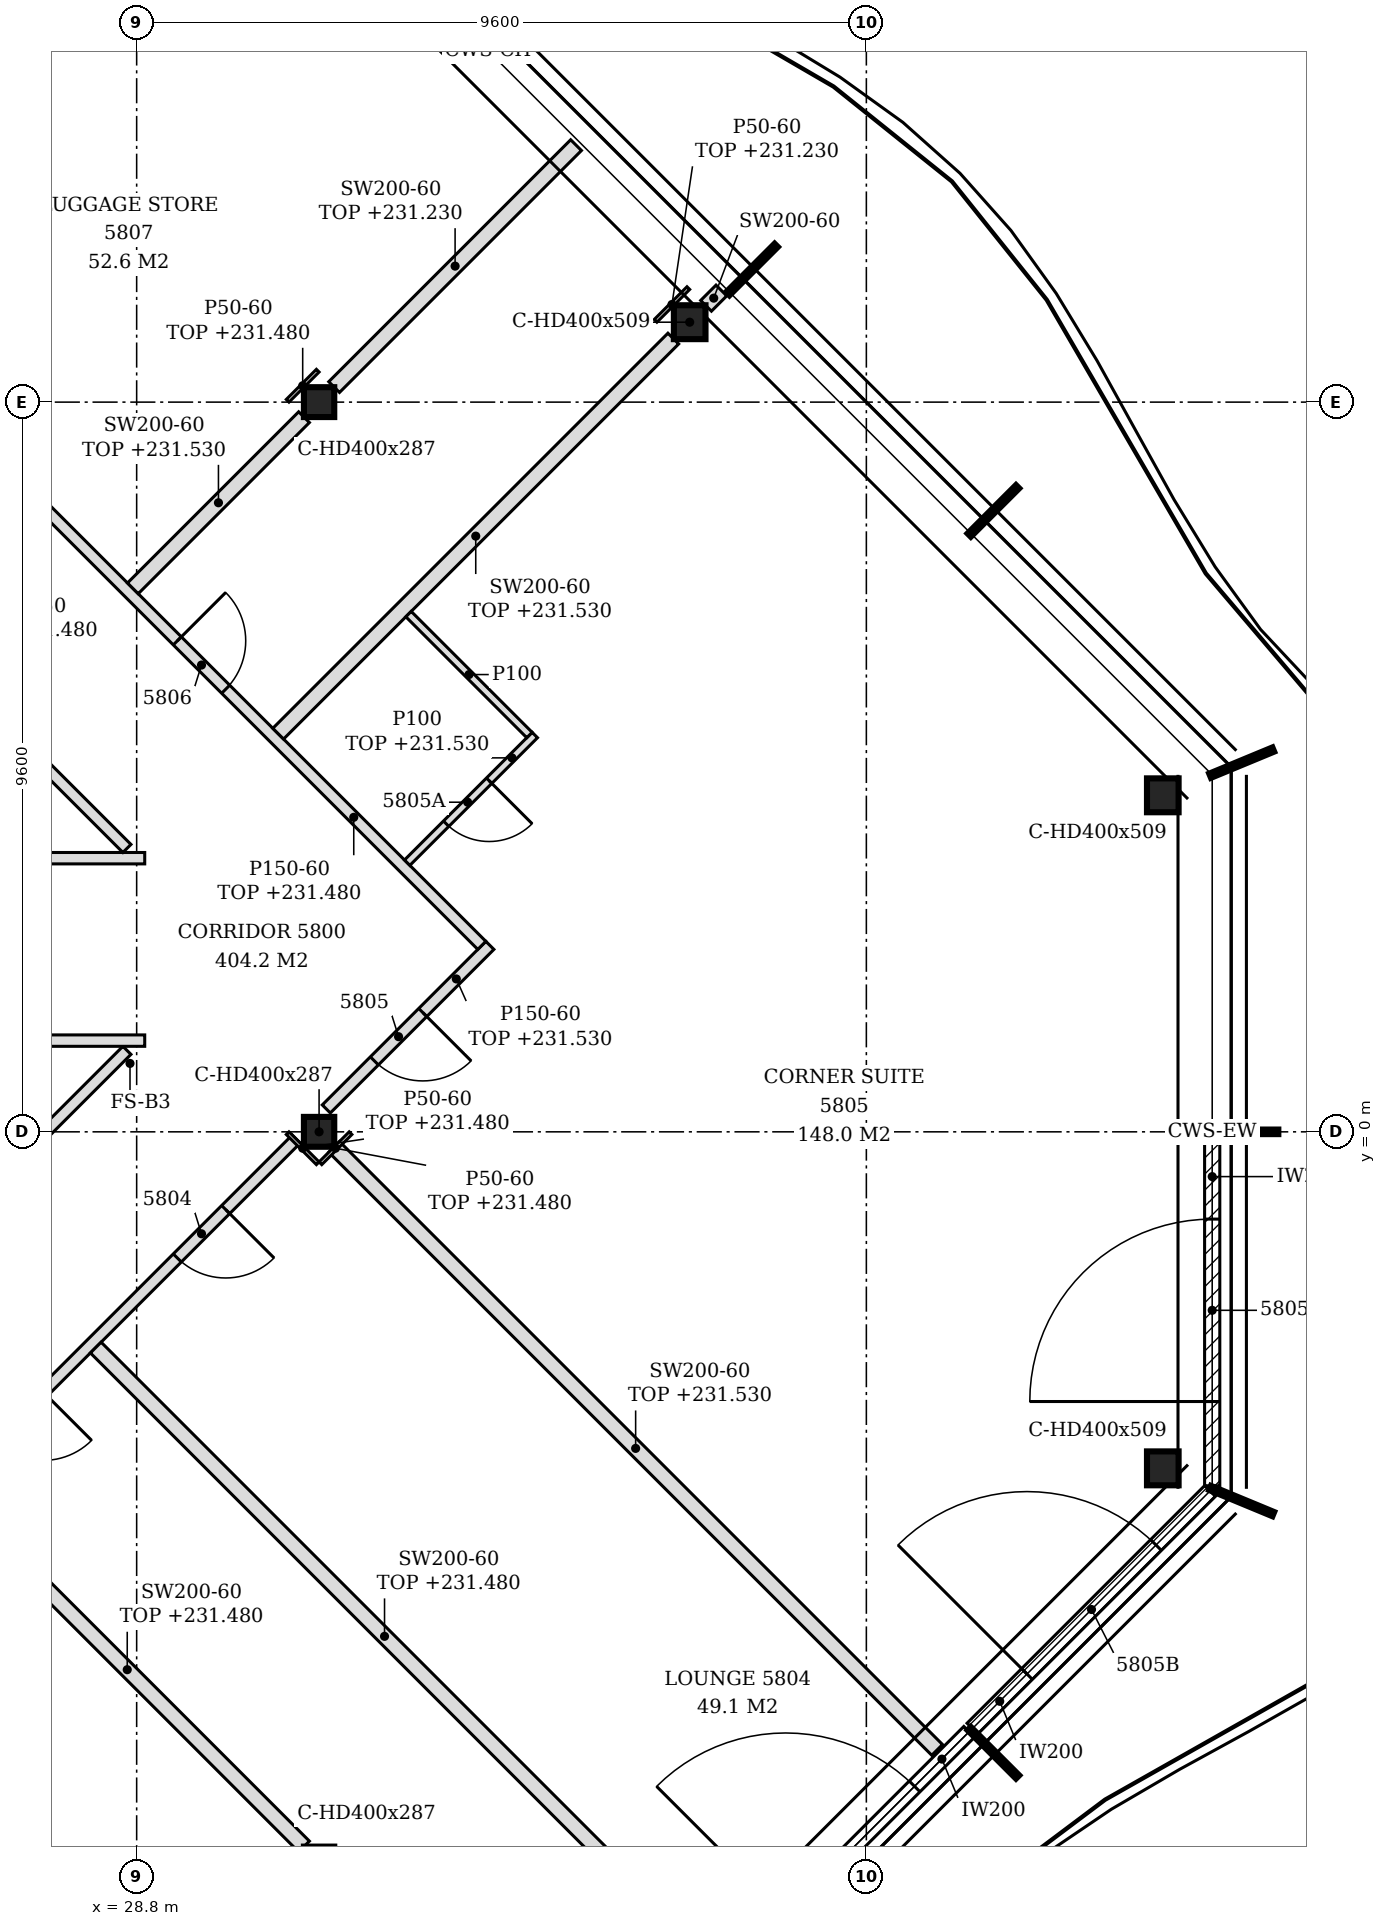
"""IFC4 building model, lengths in metres.
Left out: names, types, materials, properties, quantities, classifications, styles, units other than length and angle.
Written with IfcOpenShell. Run it as: python <this file> out.ifc"""

import sys

from ifc_helpers import new_model, si_unit, direction, frame, frame_2d, origin, origin_2d, place, context, subcontext, project, spatial, polyline, rectangle, i_section, outline, extrude, element, fill, save


model = new_model("IFC4")
c1 = context("Model", 3, precision=1e-05, world=origin(), true_north=direction((0.0, 1.0)))
c2 = subcontext(c1, "Body", "Model", "MODEL_VIEW")
j1 = project(units=[si_unit("LENGTHUNIT", "METRE"), si_unit("PLANEANGLEUNIT", "RADIAN")], contexts=[c1])
p1 = place(None, origin())
s1 = spatial("IfcSite", under=j1, at=p1, CompositionType="ELEMENT")
p2 = place(p1, origin())
s2 = spatial("IfcBuilding", under=s1, at=p2, CompositionType="ELEMENT")
p3 = place(p2, frame((0.0, 0.0, 228.6)))
s3 = spatial("IfcBuildingStorey", under=s2, at=p3, CompositionType="ELEMENT", Elevation=228.6)
for number, where, z_axis, x_axis in (
    (1, (42.3, -4.427, -0.15), (0.0, 0.0, 1.0), (1.0, 0.0, 0.0)),
    (2, (42.3, 4.427, -0.15), (0.0, 0.0, 1.0), (1.0, 0.0, 0.0)),
    (3, (36.076, 10.652, -0.15), (0.0, 0.0, 1.0), (1.0, 0.0, 0.0)),
):
    element("IfcColumn", number, at=place(p3, frame(where, z_axis=z_axis, x_axis=x_axis)), inside=s3, PredefinedType="COLUMN", context=c2, shape_type="SweptSolid", body=[
        extrude(i_section(OverallWidth=0.416, OverallDepth=0.446, WebThickness=0.039, FlangeThickness=0.063, FilletRadius=0.015, at=origin_2d()), origin(), (0.0, 0.0, 1.0), 3.6),
    ])
for number, where, z_axis, x_axis in (
    (4, (31.2, 0.0, -0.15), (0.0, 0.0, 1.0), (1.0, 0.0, 0.0)),
    (5, (31.2, 9.6, -0.15), (0.0, 0.0, 1.0), (1.0, 0.0, 0.0)),
):
    element("IfcColumn", number, at=place(p3, frame(where, z_axis=z_axis, x_axis=x_axis)), inside=s3, PredefinedType="COLUMN", context=c2, shape_type="SweptSolid", body=[
        extrude(i_section(OverallWidth=0.399, OverallDepth=0.393, WebThickness=0.023, FlangeThickness=0.037, FilletRadius=0.015, at=origin_2d()), origin(), (0.0, 0.0, 1.0), 3.6),
    ])
p4 = place(p3, frame((36.62, -11.026, 0.0), z_axis=(0.0, 0.0, 1.0), x_axis=(0.707106781187, 0.707106781187, 0.0)))
e6 = element("IfcWall", 6, at=p4, inside=s3, PredefinedType="NOTDEFINED", context=c2, shape_type="SweptSolid", body=[
    extrude(rectangle(XDim=4.431, YDim=0.2, at=frame_2d((2.215, 0.0))), origin(), (0.0, 0.0, 1.0), 3.45),
])
p5 = place(p4, frame((1.015, 0.0, 0.0)))
e7 = element("IfcOpeningElement", 7, at=p5, cuts=e6, PredefinedType="OPENING", context=c2, shape_type="SweptSolid", body=[
    extrude(rectangle(XDim=2.4, YDim=2.4, at=frame_2d((1.2, 1.2))), frame((0.0, 0.11, 0.0), z_axis=(0.0, -1.0, 0.0), x_axis=(1.0, 0.0, 0.0)), (0.0, 0.0, 1.0), 0.22),
])
p6 = place(p3, frame((39.796, -7.851, 0.0), z_axis=(0.0, 0.0, 1.0), x_axis=(0.707079168996, 0.707134392299, 0.0)))
e8 = element("IfcWall", 8, at=p6, inside=s3, PredefinedType="NOTDEFINED", context=c2, shape_type="SweptSolid", body=[
    extrude(rectangle(XDim=4.421, YDim=0.2, at=frame_2d((2.21, 0.0))), origin(), (0.0, 0.0, 1.0), 3.45),
])
p7 = place(p6, frame((1.015, 0.0, 0.0)))
e9 = element("IfcOpeningElement", 9, at=p7, cuts=e8, PredefinedType="OPENING", context=c2, shape_type="SweptSolid", body=[
    extrude(rectangle(XDim=2.4, YDim=2.4, at=frame_2d((1.2, 1.2))), frame((0.0, 0.11, 0.0), z_axis=(0.0, -1.0, 0.0), x_axis=(1.0, 0.0, 0.0)), (0.0, 0.0, 1.0), 0.22),
])
p8 = place(p3, frame((42.95, -4.656, 0.0), z_axis=(0.0, 0.0, 1.0), x_axis=(0.0, 1.0, 0.0)))
e10 = element("IfcWall", 10, at=p8, inside=s3, PredefinedType="NOTDEFINED", context=c2, shape_type="SweptSolid", body=[
    extrude(rectangle(XDim=4.626, YDim=0.2, at=frame_2d((2.313, 0.0))), origin(), (0.0, 0.0, 1.0), 3.45),
])
p9 = place(p8, frame((1.108, 0.0, 0.0)))
e11 = element("IfcOpeningElement", 11, at=p9, cuts=e10, PredefinedType="OPENING", context=c2, shape_type="SweptSolid", body=[
    extrude(rectangle(XDim=2.4, YDim=2.4, at=frame_2d((1.2, 1.2))), frame((0.0, 0.11, 0.0), z_axis=(0.0, -1.0, 0.0), x_axis=(1.0, 0.0, 0.0)), (0.0, 0.0, 1.0), 0.22),
])
p10 = place(p3, frame((29.636, -16.66, 0.0), z_axis=(0.0, 0.0, 1.0), x_axis=(-0.707095420673, 0.707118141518, 0.0)))
e12 = element("IfcWall", 12, at=p10, inside=s3, PredefinedType="PARTITIONING", context=c2, shape_type="SweptSolid", body=[
    extrude(rectangle(XDim=10.745, YDim=0.2, at=frame_2d((5.373, 0.0))), origin(), (0.0, 0.0, 1.0), 2.88),
])
p11 = place(p3, frame((16.722, -14.272, 0.0), z_axis=(0.0, 0.0, 1.0), x_axis=(0.707106781187, 0.707106781187, 0.0)))
e13 = element("IfcWall", 13, at=p11, inside=s3, PredefinedType="PARTITIONING", context=c2, shape_type="SweptSolid", body=[
    extrude(rectangle(XDim=20.049, YDim=0.15, at=frame_2d((10.025, 0.0))), origin(), (0.0, 0.0, 1.0), 2.73),
])
p12 = place(p11, frame((4.892, 0.0, 0.0)))
e14 = element("IfcOpeningElement", 14, at=p12, cuts=e13, PredefinedType="OPENING", context=c2, shape_type="SweptSolid", body=[
    extrude(rectangle(XDim=0.9, YDim=2.1, at=frame_2d((0.45, 1.05))), frame((0.0, 0.085, 0.0), z_axis=(0.0, -1.0, 0.0), x_axis=(1.0, 0.0, 0.0)), (0.0, 0.0, 1.0), 0.17),
])
p13 = place(p11, frame((10.042, 0.0, 0.0)))
e15 = element("IfcOpeningElement", 15, at=p13, cuts=e13, PredefinedType="OPENING", context=c2, shape_type="SweptSolid", body=[
    extrude(rectangle(XDim=0.9, YDim=2.1, at=frame_2d((0.45, 1.05))), frame((0.0, 0.085, 0.0), z_axis=(0.0, -1.0, 0.0), x_axis=(1.0, 0.0, 0.0)), (0.0, 0.0, 1.0), 0.17),
])
p14 = place(p11, frame((14.443, 0.0, 0.0)))
e16 = element("IfcOpeningElement", 16, at=p14, cuts=e13, PredefinedType="OPENING", context=c2, shape_type="SweptSolid", body=[
    extrude(rectangle(XDim=0.9, YDim=2.1, at=frame_2d((0.45, 1.05))), frame((0.0, 0.085, 0.0), z_axis=(0.0, -1.0, 0.0), x_axis=(1.0, 0.0, 0.0)), (0.0, 0.0, 1.0), 0.17),
])
p15 = place(p11, frame((17.837, 0.0, 0.0)))
e17 = element("IfcOpeningElement", 17, at=p15, cuts=e13, PredefinedType="OPENING", context=c2, shape_type="SweptSolid", body=[
    extrude(rectangle(XDim=0.9, YDim=2.1, at=frame_2d((0.45, 1.05))), frame((0.0, 0.085, 0.0), z_axis=(0.0, -1.0, 0.0), x_axis=(1.0, 0.0, 0.0)), (0.0, 0.0, 1.0), 0.17),
])
p16 = place(p3, frame((35.86, -10.436, 0.0), z_axis=(0.0, 0.0, 1.0), x_axis=(-0.707106781187, 0.707106781187, 0.0)))
e18 = element("IfcWall", 18, at=p16, inside=s3, PredefinedType="PARTITIONING", context=c2, shape_type="SweptSolid", body=[
    extrude(rectangle(XDim=10.745, YDim=0.2, at=frame_2d((5.373, 0.0))), origin(), (0.0, 0.0, 1.0), 2.88),
])
p17 = place(p3, frame((31.002, -9.402, 0.0), z_axis=(0.0, 0.0, 1.0), x_axis=(-0.707088226093, 0.707125335793, 0.0)))
e19 = element("IfcWall", 19, at=p17, inside=s3, PredefinedType="PARTITIONING", context=c2, shape_type="SweptSolid", body=[
    extrude(rectangle(XDim=6.579, YDim=0.2, at=frame_2d((3.29, 0.0))), origin(), (0.0, 0.0, 1.0), 2.88),
])
p18 = place(p3, frame((19.398, -8.202, 0.0), z_axis=(0.0, 0.0, 1.0), x_axis=(0.707116088468, 0.707097473782, 0.0)))
e20 = element("IfcWall", 20, at=p18, inside=s3, PredefinedType="PARTITIONING", context=c2, shape_type="SweptSolid", body=[
    extrude(rectangle(XDim=13.115, YDim=0.15, at=frame_2d((6.558, 0.0))), origin(), (0.0, 0.0, 1.0), 2.88),
])
p19 = place(p18, frame((6.058, 0.0, 0.0)))
e21 = element("IfcOpeningElement", 21, at=p19, cuts=e20, PredefinedType="OPENING", context=c2, shape_type="SweptSolid", body=[
    extrude(rectangle(XDim=0.9, YDim=2.1, at=frame_2d((0.45, 1.05))), frame((0.0, 0.085, 0.0), z_axis=(0.0, -1.0, 0.0), x_axis=(1.0, 0.0, 0.0)), (0.0, 0.0, 1.0), 0.17),
])
p20 = place(p3, frame((39.331, -8.131, 0.0), z_axis=(0.0, 0.0, 1.0), x_axis=(-0.707106781187, 0.707106781187, 0.0)))
e22 = element("IfcWall", 22, at=p20, inside=s3, PredefinedType="PARTITIONING", context=c2, shape_type="SweptSolid", body=[
    extrude(rectangle(XDim=11.219, YDim=0.2, at=frame_2d((5.61, 0.0))), origin(), (0.0, 0.0, 1.0), 2.93),
])
p21 = place(p3, frame((31.295, 0.301, 0.0), z_axis=(0.0, 0.0, 1.0), x_axis=(0.707146890479, 0.707066669618, 0.0)))
e23 = element("IfcWall", 23, at=p21, inside=s3, PredefinedType="PARTITIONING", context=c2, shape_type="SweptSolid", body=[
    extrude(rectangle(XDim=3.043, YDim=0.15, at=frame_2d((1.522, 0.0))), origin(), (0.0, 0.0, 1.0), 2.93),
])
p22 = place(p21, frame((0.895, 0.0, 0.0)))
e24 = element("IfcOpeningElement", 24, at=p22, cuts=e23, PredefinedType="OPENING", context=c2, shape_type="SweptSolid", body=[
    extrude(rectangle(XDim=0.9, YDim=2.1, at=frame_2d((0.45, 1.05))), frame((0.0, 0.085, 0.0), z_axis=(0.0, -1.0, 0.0), x_axis=(1.0, 0.0, 0.0)), (0.0, 0.0, 1.0), 0.17),
])
p23 = place(p3, frame((19.125, 1.2, 0.0), z_axis=(0.0, 0.0, 1.0), x_axis=(1.0, 0.0, 0.0)))
e25 = element("IfcWall", 25, at=p23, inside=s3, PredefinedType="PARTITIONING", context=c2, shape_type="SweptSolid", body=[
    extrude(outline(polyline([(0.0, 0.0), (9.781, 0.0), (9.781, 3.45), (0.225, 3.45), (0.223, 2.83), (0.0, 2.83), (0.0, 0.0)])), frame((0.0, 0.075, 0.0), z_axis=(0.0, -1.0, 0.0), x_axis=(1.0, 0.0, 0.0)), (0.0, 0.0, 1.0), 0.15),
])
p24 = place(p3, frame((33.341, 2.453, 0.0), z_axis=(0.0, 0.0, 1.0), x_axis=(-0.707098652635, 0.707114909645, 0.0)))
e26 = element("IfcWall", 26, at=p24, inside=s3, PredefinedType="PARTITIONING", context=c2, shape_type="SweptSolid", body=[
    extrude(rectangle(XDim=15.018, YDim=0.15, at=frame_2d((7.509, 0.0))), origin(), (0.0, 0.0, 1.0), 2.88),
])
p25 = place(p24, frame((4.766, 0.0, 0.0)))
e27 = element("IfcOpeningElement", 27, at=p25, cuts=e26, PredefinedType="OPENING", context=c2, shape_type="SweptSolid", body=[
    extrude(rectangle(XDim=0.9, YDim=2.1, at=frame_2d((0.45, 1.05))), frame((0.0, 0.085, 0.0), z_axis=(0.0, -1.0, 0.0), x_axis=(1.0, 0.0, 0.0)), (0.0, 0.0, 1.0), 0.17),
])
p26 = place(p24, frame((9.167, 0.0, 0.0)))
e28 = element("IfcOpeningElement", 28, at=p26, cuts=e26, PredefinedType="OPENING", context=c2, shape_type="SweptSolid", body=[
    extrude(rectangle(XDim=0.9, YDim=2.1, at=frame_2d((0.45, 1.05))), frame((0.0, 0.085, 0.0), z_axis=(0.0, -1.0, 0.0), x_axis=(1.0, 0.0, 0.0)), (0.0, 0.0, 1.0), 0.17),
])
p27 = place(p24, frame((13.482, 0.0, 0.0)))
e29 = element("IfcOpeningElement", 29, at=p27, cuts=e26, PredefinedType="OPENING", context=c2, shape_type="SweptSolid", body=[
    extrude(rectangle(XDim=0.9, YDim=2.1, at=frame_2d((0.45, 1.05))), frame((0.0, 0.085, 0.0), z_axis=(0.0, -1.0, 0.0), x_axis=(1.0, 0.0, 0.0)), (0.0, 0.0, 1.0), 0.17),
])
p28 = place(p3, frame((32.359, 3.541, 0.0), z_axis=(0.0, 0.0, 1.0), x_axis=(0.707158179099, 0.707055379538, 0.0)))
e30 = element("IfcWall", 30, at=p28, inside=s3, PredefinedType="PARTITIONING", context=c2, shape_type="SweptSolid", body=[
    extrude(rectangle(XDim=2.375, YDim=0.1, at=frame_2d((1.188, 0.0))), origin(), (0.0, 0.0, 1.0), 2.93),
])
p29 = place(p28, frame((0.725, 0.0, 0.0)))
e31 = element("IfcOpeningElement", 31, at=p29, cuts=e30, PredefinedType="OPENING", context=c2, shape_type="SweptSolid", body=[
    extrude(rectangle(XDim=0.8, YDim=2.1, at=frame_2d((0.4, 1.05))), frame((0.0, 0.06, 0.0), z_axis=(0.0, -1.0, 0.0), x_axis=(1.0, 0.0, 0.0)), (0.0, 0.0, 1.0), 0.12),
])
p30 = place(p3, frame((19.125, 3.6, 0.0), z_axis=(0.0, 0.0, 1.0), x_axis=(1.0, 0.0, 0.0)))
e32 = element("IfcWall", 32, at=p30, inside=s3, PredefinedType="PARTITIONING", context=c2, shape_type="SweptSolid", body=[
    extrude(outline(polyline([(0.0, 0.0), (9.781, 0.0), (9.781, 3.45), (0.225, 3.45), (0.223, 2.83), (0.0, 2.83), (0.0, 0.0)])), frame((0.0, 0.075, 0.0), z_axis=(0.0, -1.0, 0.0), x_axis=(1.0, 0.0, 0.0)), (0.0, 0.0, 1.0), 0.15),
])
p31 = place(p30, frame((1.175, 0.0, 0.0)))
e33 = element("IfcOpeningElement", 33, at=p31, cuts=e32, PredefinedType="OPENING", context=c2, shape_type="SweptSolid", body=[
    extrude(rectangle(XDim=0.8, YDim=2.1, at=frame_2d((0.4, 1.05))), frame((0.0, 0.085, 0.0), z_axis=(0.0, -1.0, 0.0), x_axis=(1.0, 0.0, 0.0)), (0.0, 0.0, 1.0), 0.17),
])
p32 = place(p3, frame((28.672, 3.728, 0.0), z_axis=(0.0, 0.0, 1.0), x_axis=(-0.707116088468, 0.707097473782, 0.0)))
e34 = element("IfcWall", 34, at=p32, inside=s3, PredefinedType="PARTITIONING", context=c2, shape_type="SweptSolid", body=[
    extrude(rectangle(XDim=13.115, YDim=0.15, at=frame_2d((6.558, 0.0))), origin(), (0.0, 0.0, 1.0), 2.88),
])
p33 = place(p32, frame((6.157, 0.0, 0.0)))
e35 = element("IfcOpeningElement", 35, at=p33, cuts=e34, PredefinedType="OPENING", context=c2, shape_type="SweptSolid", body=[
    extrude(rectangle(XDim=0.9, YDim=2.1, at=frame_2d((0.45, 1.05))), frame((0.0, 0.085, 0.0), z_axis=(0.0, -1.0, 0.0), x_axis=(1.0, 0.0, 0.0)), (0.0, 0.0, 1.0), 0.17),
])
p34 = place(p3, frame((30.662, 5.238, 0.0), z_axis=(0.0, 0.0, 1.0), x_axis=(0.707106781187, 0.707106781187, 0.0)))
e36 = element("IfcWall", 36, at=p34, inside=s3, PredefinedType="PARTITIONING", context=c2, shape_type="SweptSolid", body=[
    extrude(rectangle(XDim=7.351, YDim=0.2, at=frame_2d((3.676, 0.0))), origin(), (0.0, 0.0, 1.0), 2.93),
])
p35 = place(p3, frame((33.968, 5.22, 0.0), z_axis=(0.0, 0.0, 1.0), x_axis=(-0.707106781187, 0.707106781187, 0.0)))
e37 = element("IfcWall", 37, at=p35, inside=s3, PredefinedType="PARTITIONING", context=c2, shape_type="SweptSolid", body=[
    extrude(rectangle(XDim=2.25, YDim=0.1, at=frame_2d((1.125, 0.0))), origin(), (0.0, 0.0, 1.0), 3.45),
])
p36 = place(p3, frame((28.75, 7.15, 0.0), z_axis=(0.0, 0.0, 1.0), x_axis=(0.7070684525, 0.707145107796, 0.0)))
e38 = element("IfcWall", 38, at=p36, inside=s3, PredefinedType="PARTITIONING", context=c2, shape_type="SweptSolid", body=[
    extrude(rectangle(XDim=3.185, YDim=0.2, at=frame_2d((1.592, 0.0))), origin(), (0.0, 0.0, 1.0), 2.93),
])
p37 = place(p3, frame((31.398, 9.798, 0.0), z_axis=(0.0, 0.0, 1.0), x_axis=(0.707133900936, 0.707079660397, 0.0)))
e39 = element("IfcWall", 39, at=p37, inside=s3, PredefinedType="PARTITIONING", context=c2, shape_type="SweptSolid", body=[
    extrude(rectangle(XDim=4.501, YDim=0.2, at=frame_2d((2.25, 0.0))), origin(), (0.0, 0.0, 1.0), 2.63),
])
p38 = place(p3, frame((36.291, 10.867, 0.0), z_axis=(0.0, 0.0, 1.0), x_axis=(0.707534423513, 0.706678880075, 0.0)))
e40 = element("IfcWall", 40, at=p38, inside=s3, PredefinedType="PARTITIONING", context=c2, shape_type="SweptSolid", body=[
    extrude(rectangle(XDim=0.285, YDim=0.2, at=frame_2d((0.143, 0.0))), origin(), (0.0, 0.0, 1.0), 3.45),
])
p39 = place(p3, frame((24.438, 11.462, 0.0), z_axis=(0.0, 0.0, 1.0), x_axis=(0.707090175614, 0.707123386369, 0.0)))
e41 = element("IfcWall", 41, at=p39, inside=s3, PredefinedType="PARTITIONING", context=c2, shape_type="SweptSolid", body=[
    extrude(rectangle(XDim=7.351, YDim=0.2, at=frame_2d((3.676, 0.0))), origin(), (0.0, 0.0, 1.0), 2.88),
])
for number, where, z_axis, x_axis in (
    (42, (31.218, -0.414, 0.0), (0.0, 0.0, 1.0), (0.707, 0.707, 0.0)),
    (43, (31.182, -0.414, 0.0), (0.0, 0.0, 1.0), (-0.707, 0.707, 0.0)),
):
    element("IfcWall", number, at=place(p3, frame(where, z_axis=z_axis, x_axis=x_axis)), inside=s3, PredefinedType="PARTITIONING", context=c2, shape_type="SweptSolid", body=[
        extrude(rectangle(XDim=0.56, YDim=0.05, at=frame_2d((0.28, 0.0))), origin(), (0.0, 0.0, 1.0), 2.88),
    ])
p40 = place(p3, frame((35.627, 10.669, 0.0), z_axis=(0.0, 0.0, 1.0), x_axis=(0.707307009627, 0.706906496032, 0.0)))
e44 = element("IfcWall", 44, at=p40, inside=s3, PredefinedType="PARTITIONING", context=c2, shape_type="SweptSolid", body=[
    extrude(rectangle(XDim=0.61, YDim=0.05, at=frame_2d((0.305, 0.0))), origin(), (0.0, 0.0, 1.0), 2.63),
])
p41 = place(p3, frame((30.786, 9.618, 0.0), z_axis=(0.0, 0.0, 1.0), x_axis=(0.707106781187, 0.707106781187, 0.0)))
e45 = element("IfcWall", 45, at=p41, inside=s3, PredefinedType="PARTITIONING", context=c2, shape_type="SweptSolid", body=[
    extrude(rectangle(XDim=0.56, YDim=0.05, at=frame_2d((0.28, 0.0))), origin(), (0.0, 0.0, 1.0), 2.88),
])
p42 = place(p5, origin())
e46 = element("IfcDoor", 46, at=p42, inside=s3, OperationType="SINGLE_SWING_LEFT", PredefinedType="DOOR", context=c2, shape_type="SweptSolid", body=[
    extrude(rectangle(XDim=2.4, YDim=2.4, at=frame_2d((1.2, 1.2))), frame((0.0, 0.025, 0.0), z_axis=(0.0, -1.0, 0.0), x_axis=(1.0, 0.0, 0.0)), (0.0, 0.0, 1.0), 0.05),
])
fill(e7, e46)
p43 = place(p7, origin())
e47 = element("IfcDoor", 47, at=p43, inside=s3, OperationType="SINGLE_SWING_LEFT", PredefinedType="DOOR", context=c2, shape_type="SweptSolid", body=[
    extrude(rectangle(XDim=2.4, YDim=2.4, at=frame_2d((1.2, 1.2))), frame((0.0, 0.025, 0.0), z_axis=(0.0, -1.0, 0.0), x_axis=(1.0, 0.0, 0.0)), (0.0, 0.0, 1.0), 0.05),
])
fill(e9, e47)
p44 = place(p9, origin())
e48 = element("IfcDoor", 48, at=p44, inside=s3, OperationType="SINGLE_SWING_LEFT", PredefinedType="DOOR", context=c2, shape_type="SweptSolid", body=[
    extrude(rectangle(XDim=2.4, YDim=2.4, at=frame_2d((1.2, 1.2))), frame((0.0, 0.025, 0.0), z_axis=(0.0, -1.0, 0.0), x_axis=(1.0, 0.0, 0.0)), (0.0, 0.0, 1.0), 0.05),
])
fill(e11, e48)
p45 = place(p15, frame((0.9, 0.0, 0.0), z_axis=(0.0, 0.0, 1.0), x_axis=(-1.0, 0.0, 0.0)))
e49 = element("IfcDoor", 49, at=p45, inside=s3, OperationType="SINGLE_SWING_LEFT", PredefinedType="DOOR", context=c2, shape_type="SweptSolid", body=[
    extrude(rectangle(XDim=0.9, YDim=2.1, at=frame_2d((0.45, 1.05))), frame((0.0, 0.025, 0.0), z_axis=(0.0, -1.0, 0.0), x_axis=(1.0, 0.0, 0.0)), (0.0, 0.0, 1.0), 0.05),
])
fill(e17, e49)
p46 = place(p22, frame((0.9, 0.0, 0.0), z_axis=(0.0, 0.0, 1.0), x_axis=(-1.0, 0.0, 0.0)))
e50 = element("IfcDoor", 50, at=p46, inside=s3, OperationType="SINGLE_SWING_LEFT", PredefinedType="DOOR", context=c2, shape_type="SweptSolid", body=[
    extrude(rectangle(XDim=0.9, YDim=2.1, at=frame_2d((0.45, 1.05))), frame((0.0, 0.025, 0.0), z_axis=(0.0, -1.0, 0.0), x_axis=(1.0, 0.0, 0.0)), (0.0, 0.0, 1.0), 0.05),
])
fill(e24, e50)
p47 = place(p29, frame((0.8, 0.0, 0.0), z_axis=(0.0, 0.0, 1.0), x_axis=(-1.0, 0.0, 0.0)))
e51 = element("IfcDoor", 51, at=p47, inside=s3, OperationType="SINGLE_SWING_LEFT", PredefinedType="DOOR", context=c2, shape_type="SweptSolid", body=[
    extrude(rectangle(XDim=0.8, YDim=2.1, at=frame_2d((0.4, 1.05))), frame((0.0, 0.025, 0.0), z_axis=(0.0, -1.0, 0.0), x_axis=(1.0, 0.0, 0.0)), (0.0, 0.0, 1.0), 0.05),
])
fill(e31, e51)
p48 = place(p25, frame((0.9, 0.0, 0.0), z_axis=(0.0, 0.0, 1.0), x_axis=(-1.0, 0.0, 0.0)))
e52 = element("IfcDoor", 52, at=p48, inside=s3, OperationType="SINGLE_SWING_LEFT", PredefinedType="DOOR", context=c2, shape_type="SweptSolid", body=[
    extrude(rectangle(XDim=0.9, YDim=2.1, at=frame_2d((0.45, 1.05))), frame((0.0, 0.025, 0.0), z_axis=(0.0, -1.0, 0.0), x_axis=(1.0, 0.0, 0.0)), (0.0, 0.0, 1.0), 0.05),
])
fill(e27, e52)
save(model, sys.argv[1])
